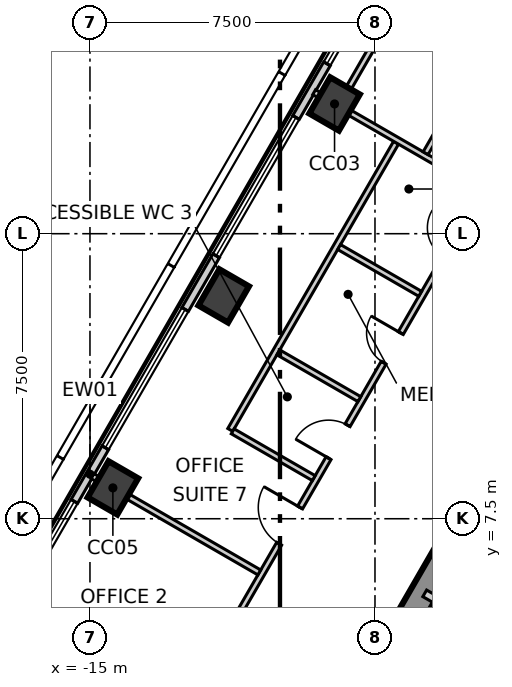
"""IFC4 building model, lengths in metres.
Left out: names, types, materials, properties, quantities, classifications, styles, units other than length and angle.
Written with IfcOpenShell. Run it as: python <this file> out.ifc"""

import sys

from ifc_helpers import new_model, si_unit, direction, frame, frame_2d, origin, origin_2d, place, context, subcontext, project, spatial, polyline, rectangle, outline, extrude, element, fill, save


model = new_model("IFC4")
c1 = context("Model", 3, precision=1e-05, world=origin(), true_north=direction((0.0, 1.0)))
c2 = subcontext(c1, "Body", "Model", "MODEL_VIEW")
j1 = project(units=[si_unit("LENGTHUNIT", "METRE"), si_unit("PLANEANGLEUNIT", "RADIAN")], contexts=[c1])
p1 = place(None, origin())
s1 = spatial("IfcSite", under=j1, at=p1, CompositionType="ELEMENT")
p2 = place(p1, origin())
s2 = spatial("IfcBuilding", under=s1, at=p2, CompositionType="ELEMENT")
p3 = place(p2, frame((0.0, 0.0, 239.3)))
s3 = spatial("IfcBuildingStorey", under=s2, at=p3, CompositionType="ELEMENT", Elevation=239.3)
p4 = place(p3, frame((-1.703, 13.35, -0.3), z_axis=(0.0, 0.0, 1.0), x_axis=(-0.500011533395, -0.866018744874, 0.0)))
e1 = element("IfcWall", 1, at=p4, inside=s3, PredefinedType="SHEAR", context=c2, shape_type="SweptSolid", body=[
    extrude(outline(polyline([(-0.202, -0.35), (1.782, -0.35), (3.766, -0.35), (5.75, -0.35), (7.734, -0.35), (9.718, -0.35), (11.702, -0.35), (13.686, -0.35), (15.67, -0.35), (17.654, -0.35), (19.638, -0.35), (21.622, -0.35), (21.218, 0.35), (19.307, 0.35), (17.397, 0.35), (15.486, 0.35), (13.576, 0.35), (11.665, 0.35), (9.755, 0.35), (7.844, 0.35), (5.934, 0.35), (4.023, 0.35), (2.113, 0.35), (0.202, 0.35), (-0.202, -0.35)])), origin(), (0.0, 0.0, 1.0), 4.0),
])
p5 = place(p4, frame((10.16, 0.0, 0.3)))
e2 = element("IfcOpeningElement", 2, at=p5, cuts=e1, PredefinedType="OPENING", context=c2, shape_type="SweptSolid", body=[
    extrude(rectangle(XDim=1.1, YDim=2.1, at=frame_2d((0.55, 1.05))), frame((0.0, 0.36, 0.0), z_axis=(0.0, -1.0, 0.0), x_axis=(1.0, 0.0, 0.0)), (0.0, 0.0, 1.0), 0.72),
])
for number, where, z_axis, x_axis in (
    (3, (-8.564, 18.414, -0.3), (0.0, 0.0, 1.0), (0.5, 0.866, 0.0)),
    (4, (-11.481, 13.363, -0.3), (0.0, 0.0, 1.0), (0.5, 0.866, 0.0)),
    (5, (-14.397, 8.312, -0.3), (0.0, 0.0, 1.0), (0.5, 0.866, 0.0)),
):
    element("IfcColumn", number, at=place(p3, frame(where, z_axis=z_axis, x_axis=x_axis)), inside=s3, PredefinedType="COLUMN", context=c2, shape_type="SweptSolid", body=[
        extrude(rectangle(XDim=1.1, YDim=0.9, at=origin_2d()), origin(), (0.0, 0.0, 1.0), 4.0),
    ])
p6 = place(p3, frame((-2.687, 29.995, 0.0), z_axis=(0.0, 0.0, 1.0), x_axis=(-0.499992950893, -0.86602947355, 0.0)))
e6 = element("IfcWall", 6, at=p6, inside=s3, PredefinedType="ELEMENTEDWALL", context=c2, shape_type="SweptSolid", body=[
    extrude(rectangle(XDim=49.247, YDim=0.2, at=frame_2d((24.624, 0.0))), origin(), (0.0, 0.0, 1.0), 3.7),
])
p7 = place(p6, frame((2.119, 0.0, 0.9)))
e7 = element("IfcOpeningElement", 7, at=p7, cuts=e6, PredefinedType="OPENING", context=c2, shape_type="SweptSolid", body=[
    extrude(rectangle(XDim=4.2, YDim=2.5, at=frame_2d((2.1, 1.25))), frame((0.0, 0.11, 0.0), z_axis=(0.0, -1.0, 0.0), x_axis=(1.0, 0.0, 0.0)), (0.0, 0.0, 1.0), 0.22),
])
p8 = place(p6, frame((7.951, 0.0, 0.9)))
e8 = element("IfcOpeningElement", 8, at=p8, cuts=e6, PredefinedType="OPENING", context=c2, shape_type="SweptSolid", body=[
    extrude(rectangle(XDim=4.2, YDim=2.5, at=frame_2d((2.1, 1.25))), frame((0.0, 0.11, 0.0), z_axis=(0.0, -1.0, 0.0), x_axis=(1.0, 0.0, 0.0)), (0.0, 0.0, 1.0), 0.22),
])
p9 = place(p6, frame((13.784, 0.0, 0.9)))
e9 = element("IfcOpeningElement", 9, at=p9, cuts=e6, PredefinedType="OPENING", context=c2, shape_type="SweptSolid", body=[
    extrude(rectangle(XDim=4.2, YDim=2.5, at=frame_2d((2.1, 1.25))), frame((0.0, 0.11, 0.0), z_axis=(0.0, -1.0, 0.0), x_axis=(1.0, 0.0, 0.0)), (0.0, 0.0, 1.0), 0.22),
])
p10 = place(p6, frame((19.617, 0.0, 0.9)))
e10 = element("IfcOpeningElement", 10, at=p10, cuts=e6, PredefinedType="OPENING", context=c2, shape_type="SweptSolid", body=[
    extrude(rectangle(XDim=4.2, YDim=2.5, at=frame_2d((2.1, 1.25))), frame((0.0, 0.11, 0.0), z_axis=(0.0, -1.0, 0.0), x_axis=(1.0, 0.0, 0.0)), (0.0, 0.0, 1.0), 0.22),
])
p11 = place(p6, frame((25.449, 0.0, 0.9)))
e11 = element("IfcOpeningElement", 11, at=p11, cuts=e6, PredefinedType="OPENING", context=c2, shape_type="SweptSolid", body=[
    extrude(rectangle(XDim=4.2, YDim=2.5, at=frame_2d((2.1, 1.25))), frame((0.0, 0.11, 0.0), z_axis=(0.0, -1.0, 0.0), x_axis=(1.0, 0.0, 0.0)), (0.0, 0.0, 1.0), 0.22),
])
p12 = place(p6, frame((31.282, 0.0, 0.9)))
e12 = element("IfcOpeningElement", 12, at=p12, cuts=e6, PredefinedType="OPENING", context=c2, shape_type="SweptSolid", body=[
    extrude(rectangle(XDim=4.2, YDim=2.5, at=frame_2d((2.1, 1.25))), frame((0.0, 0.11, 0.0), z_axis=(0.0, -1.0, 0.0), x_axis=(1.0, 0.0, 0.0)), (0.0, 0.0, 1.0), 0.22),
])
p13 = place(p6, frame((37.115, 0.0, 0.9)))
e13 = element("IfcOpeningElement", 13, at=p13, cuts=e6, PredefinedType="OPENING", context=c2, shape_type="SweptSolid", body=[
    extrude(rectangle(XDim=4.2, YDim=2.5, at=frame_2d((2.1, 1.25))), frame((0.0, 0.11, 0.0), z_axis=(0.0, -1.0, 0.0), x_axis=(1.0, 0.0, 0.0)), (0.0, 0.0, 1.0), 0.22),
])
p14 = place(p6, frame((42.947, 0.0, 0.9)))
e14 = element("IfcOpeningElement", 14, at=p14, cuts=e6, PredefinedType="OPENING", context=c2, shape_type="SweptSolid", body=[
    extrude(rectangle(XDim=4.2, YDim=2.5, at=frame_2d((2.1, 1.25))), frame((0.0, 0.11, 0.0), z_axis=(0.0, -1.0, 0.0), x_axis=(1.0, 0.0, 0.0)), (0.0, 0.0, 1.0), 0.22),
])
p15 = place(p3, frame((-20.883, -11.97, 0.0), z_axis=(0.0, 0.0, 1.0), x_axis=(0.500006150555, 0.866021852731, 0.0)))
e15 = element("IfcWall", 15, at=p15, inside=s3, PredefinedType="PARTITIONING", context=c2, shape_type="SweptSolid", body=[
    extrude(rectangle(XDim=41.766, YDim=0.15, at=frame_2d((20.883, 0.0))), origin(), (0.0, 0.0, 1.0), 3.7),
])
p16 = place(p15, frame((36.616, 0.0, 0.0)))
e16 = element("IfcOpeningElement", 16, at=p16, cuts=e15, PredefinedType="OPENING", context=c2, shape_type="SweptSolid", body=[
    extrude(rectangle(XDim=1.1, YDim=2.1, at=frame_2d((0.55, 1.05))), frame((0.0, 0.085, 0.0), z_axis=(0.0, -1.0, 0.0), x_axis=(1.0, 0.0, 0.0)), (0.0, 0.0, 1.0), 0.17),
])
p17 = place(p15, frame((21.723, 0.0, 0.0)))
e17 = element("IfcOpeningElement", 17, at=p17, cuts=e15, PredefinedType="OPENING", context=c2, shape_type="SweptSolid", body=[
    extrude(rectangle(XDim=1.1, YDim=2.1, at=frame_2d((0.55, 1.05))), frame((0.0, 0.085, 0.0), z_axis=(0.0, -1.0, 0.0), x_axis=(1.0, 0.0, 0.0)), (0.0, 0.0, 1.0), 0.17),
])
p18 = place(p15, frame((30.423, 0.0, 0.0)))
e18 = element("IfcOpeningElement", 18, at=p18, cuts=e15, PredefinedType="OPENING", context=c2, shape_type="SweptSolid", body=[
    extrude(rectangle(XDim=0.9, YDim=2.1, at=frame_2d((0.45, 1.05))), frame((0.0, 0.085, 0.0), z_axis=(0.0, -1.0, 0.0), x_axis=(1.0, 0.0, 0.0)), (0.0, 0.0, 1.0), 0.17),
])
p19 = place(p15, frame((27.223, 0.0, 0.0)))
e19 = element("IfcOpeningElement", 19, at=p19, cuts=e15, PredefinedType="OPENING", context=c2, shape_type="SweptSolid", body=[
    extrude(rectangle(XDim=0.9, YDim=2.1, at=frame_2d((0.45, 1.05))), frame((0.0, 0.085, 0.0), z_axis=(0.0, -1.0, 0.0), x_axis=(1.0, 0.0, 0.0)), (0.0, 0.0, 1.0), 0.17),
])
p20 = place(p15, frame((24.323, 0.0, 0.0)))
e20 = element("IfcOpeningElement", 20, at=p20, cuts=e15, PredefinedType="OPENING", context=c2, shape_type="SweptSolid", body=[
    extrude(rectangle(XDim=1.0, YDim=2.1, at=frame_2d((0.5, 1.05))), frame((0.0, 0.085, 0.0), z_axis=(0.0, -1.0, 0.0), x_axis=(1.0, 0.0, 0.0)), (0.0, 0.0, 1.0), 0.17),
])
p21 = place(p15, frame((17.358, 0.0, 0.0)))
e21 = element("IfcOpeningElement", 21, at=p21, cuts=e15, PredefinedType="OPENING", context=c2, shape_type="SweptSolid", body=[
    extrude(rectangle(XDim=1.0, YDim=2.1, at=frame_2d((0.5, 1.05))), frame((0.0, 0.085, 0.0), z_axis=(0.0, -1.0, 0.0), x_axis=(1.0, 0.0, 0.0)), (0.0, 0.0, 1.0), 0.17),
])
p22 = place(p15, frame((6.825, 0.0, 0.0)))
e22 = element("IfcOpeningElement", 22, at=p22, cuts=e15, PredefinedType="OPENING", context=c2, shape_type="SweptSolid", body=[
    extrude(rectangle(XDim=1.1, YDim=2.1, at=frame_2d((0.55, 1.05))), frame((0.0, 0.085, 0.0), z_axis=(0.0, -1.0, 0.0), x_axis=(1.0, 0.0, 0.0)), (0.0, 0.0, 1.0), 0.17),
])
p23 = place(p3, frame((-14.934, 8.622, 0.0), z_axis=(0.0, 0.0, 1.0), x_axis=(0.86598187042, -0.500075394419, 0.0)))
e23 = element("IfcWall", 23, at=p23, inside=s3, PredefinedType="PARTITIONING", context=c2, shape_type="SweptSolid", body=[
    extrude(rectangle(XDim=5.07, YDim=0.15, at=frame_2d((2.535, 0.0))), origin(), (0.0, 0.0, 1.0), 3.2),
])
p24 = place(p3, frame((-11.308, 9.837, 0.0), z_axis=(0.0, 0.0, 1.0), x_axis=(0.499958218515, 0.866049524992, 0.0)))
e24 = element("IfcWall", 24, at=p24, inside=s3, PredefinedType="PARTITIONING", context=c2, shape_type="SweptSolid", body=[
    extrude(rectangle(XDim=8.725, YDim=0.15, at=frame_2d((4.362, 0.0))), origin(), (0.0, 0.0, 1.0), 3.7),
])
for number, where, z_axis, x_axis in (
    (25, (-11.244, 9.8, 0.0), (0.0, 0.0, 1.0), (0.866, -0.5, 0.0)),
    (26, (-10.044, 11.878, 0.0), (0.0, 0.0, 1.0), (0.866, -0.5, 0.0)),
):
    element("IfcWall", number, at=place(p3, frame(where, z_axis=z_axis, x_axis=x_axis)), inside=s3, PredefinedType="PARTITIONING", context=c2, shape_type="SweptSolid", body=[
        extrude(rectangle(XDim=2.463, YDim=0.15, at=frame_2d((1.231, 0.0))), origin(), (0.0, 0.0, 1.0), 3.7),
    ])
p25 = place(p3, frame((-9.101, 18.724, 0.0), z_axis=(0.0, 0.0, 1.0), x_axis=(0.866065287345, -0.499930913282, 0.0)))
e27 = element("IfcWall", 27, at=p25, inside=s3, PredefinedType="PARTITIONING", context=c2, shape_type="SweptSolid", body=[
    extrude(rectangle(XDim=5.069, YDim=0.15, at=frame_2d((2.535, 0.0))), origin(), (0.0, 0.0, 1.0), 3.7),
])
p26 = place(p3, frame((-8.444, 14.649, 0.0), z_axis=(0.0, 0.0, 1.0), x_axis=(0.86612451545, -0.499828294254, 0.0)))
e28 = element("IfcWall", 28, at=p26, inside=s3, PredefinedType="PARTITIONING", context=c2, shape_type="SweptSolid", body=[
    extrude(rectangle(XDim=2.463, YDim=0.15, at=frame_2d((1.231, 0.0))), origin(), (0.0, 0.0, 1.0), 3.7),
])
p27 = place(p3, frame((-8.43, 18.423, 0.0), z_axis=(0.0, 0.0, 1.0), x_axis=(0.500069422629, 0.865985318901, 0.0)))
e29 = element("IfcWall", 29, at=p27, inside=s3, PredefinedType="PARTITIONING", context=c2, shape_type="SweptSolid", body=[
    extrude(rectangle(XDim=5.725, YDim=0.15, at=frame_2d((2.863, 0.0))), origin(), (0.0, 0.0, 1.0), 2.95),
])
p28 = place(p3, frame((-6.168, 17.117, 0.0), z_axis=(0.0, 0.0, 1.0), x_axis=(0.500069422629, 0.865985318901, 0.0)))
e30 = element("IfcWall", 30, at=p28, inside=s3, PredefinedType="PARTITIONING", context=c2, shape_type="SweptSolid", body=[
    extrude(rectangle(XDim=5.725, YDim=0.15, at=frame_2d((2.863, 0.0))), origin(), (0.0, 0.0, 1.0), 3.7),
])
p29 = place(p28, frame((1.275, 0.0, 0.0)))
e31 = element("IfcOpeningElement", 31, at=p29, cuts=e30, PredefinedType="OPENING", context=c2, shape_type="SweptSolid", body=[
    extrude(rectangle(XDim=0.9, YDim=2.1, at=frame_2d((0.45, 1.05))), frame((0.0, 0.085, 0.0), z_axis=(0.0, -1.0, 0.0), x_axis=(1.0, 0.0, 0.0)), (0.0, 0.0, 1.0), 0.17),
])
p30 = place(p3, frame((-6.191, 5.537, 0.0), z_axis=(0.0, 0.0, 1.0), x_axis=(0.866052607023, -0.499952879648, 0.0)))
e32 = element("IfcWall", 32, at=p30, inside=s3, PredefinedType="SOLIDWALL", context=c2, shape_type="SweptSolid", body=[
    extrude(rectangle(XDim=3.332, YDim=0.2, at=frame_2d((1.666, 0.0))), origin(), (0.0, 0.0, 1.0), 3.7),
])
p31 = place(p30, frame((1.83, 0.0, 0.0)))
e33 = element("IfcOpeningElement", 33, at=p31, cuts=e32, PredefinedType="OPENING", context=c2, shape_type="SweptSolid", body=[
    extrude(rectangle(XDim=0.9, YDim=2.1, at=frame_2d((0.45, 1.05))), frame((0.0, 0.11, 0.0), z_axis=(0.0, -1.0, 0.0), x_axis=(1.0, 0.0, 0.0)), (0.0, 0.0, 1.0), 0.22),
])
p32 = place(p8, origin())
e34 = element("IfcWindow", 34, at=p32, inside=s3, PartitioningType="SINGLE_PANEL", PredefinedType="WINDOW", context=c2, shape_type="SweptSolid", body=[
    extrude(rectangle(XDim=4.2, YDim=2.5, at=frame_2d((2.1, 1.25))), frame((0.0, 0.03, 0.0), z_axis=(0.0, -1.0, 0.0), x_axis=(1.0, 0.0, 0.0)), (0.0, 0.0, 1.0), 0.06),
])
fill(e8, e34)
p33 = place(p9, origin())
e35 = element("IfcWindow", 35, at=p33, inside=s3, PartitioningType="SINGLE_PANEL", PredefinedType="WINDOW", context=c2, shape_type="SweptSolid", body=[
    extrude(rectangle(XDim=4.2, YDim=2.5, at=frame_2d((2.1, 1.25))), frame((0.0, 0.03, 0.0), z_axis=(0.0, -1.0, 0.0), x_axis=(1.0, 0.0, 0.0)), (0.0, 0.0, 1.0), 0.06),
])
fill(e9, e35)
p34 = place(p10, origin())
e36 = element("IfcWindow", 36, at=p34, inside=s3, PartitioningType="SINGLE_PANEL", PredefinedType="WINDOW", context=c2, shape_type="SweptSolid", body=[
    extrude(rectangle(XDim=4.2, YDim=2.5, at=frame_2d((2.1, 1.25))), frame((0.0, 0.03, 0.0), z_axis=(0.0, -1.0, 0.0), x_axis=(1.0, 0.0, 0.0)), (0.0, 0.0, 1.0), 0.06),
])
fill(e10, e36)
p35 = place(p11, origin())
e37 = element("IfcWindow", 37, at=p35, inside=s3, PartitioningType="SINGLE_PANEL", PredefinedType="WINDOW", context=c2, shape_type="SweptSolid", body=[
    extrude(rectangle(XDim=4.2, YDim=2.5, at=frame_2d((2.1, 1.25))), frame((0.0, 0.03, 0.0), z_axis=(0.0, -1.0, 0.0), x_axis=(1.0, 0.0, 0.0)), (0.0, 0.0, 1.0), 0.06),
])
fill(e11, e37)
p36 = place(p17, origin())
e38 = element("IfcDoor", 38, at=p36, inside=s3, OperationType="SINGLE_SWING_LEFT", PredefinedType="DOOR", context=c2, shape_type="SweptSolid", body=[
    extrude(rectangle(XDim=1.1, YDim=2.1, at=frame_2d((0.55, 1.05))), frame((0.0, 0.025, 0.0), z_axis=(0.0, -1.0, 0.0), x_axis=(1.0, 0.0, 0.0)), (0.0, 0.0, 1.0), 0.05),
])
fill(e17, e38)
p37 = place(p19, origin())
e39 = element("IfcDoor", 39, at=p37, inside=s3, OperationType="SINGLE_SWING_LEFT", PredefinedType="DOOR", context=c2, shape_type="SweptSolid", body=[
    extrude(rectangle(XDim=0.9, YDim=2.1, at=frame_2d((0.45, 1.05))), frame((0.0, 0.025, 0.0), z_axis=(0.0, -1.0, 0.0), x_axis=(1.0, 0.0, 0.0)), (0.0, 0.0, 1.0), 0.05),
])
fill(e19, e39)
p38 = place(p20, origin())
e40 = element("IfcDoor", 40, at=p38, inside=s3, OperationType="SINGLE_SWING_RIGHT", PredefinedType="DOOR", context=c2, shape_type="SweptSolid", body=[
    extrude(rectangle(XDim=1.0, YDim=2.1, at=frame_2d((0.5, 1.05))), frame((0.0, 0.025, 0.0), z_axis=(0.0, -1.0, 0.0), x_axis=(1.0, 0.0, 0.0)), (0.0, 0.0, 1.0), 0.05),
])
fill(e20, e40)
save(model, sys.argv[1])
